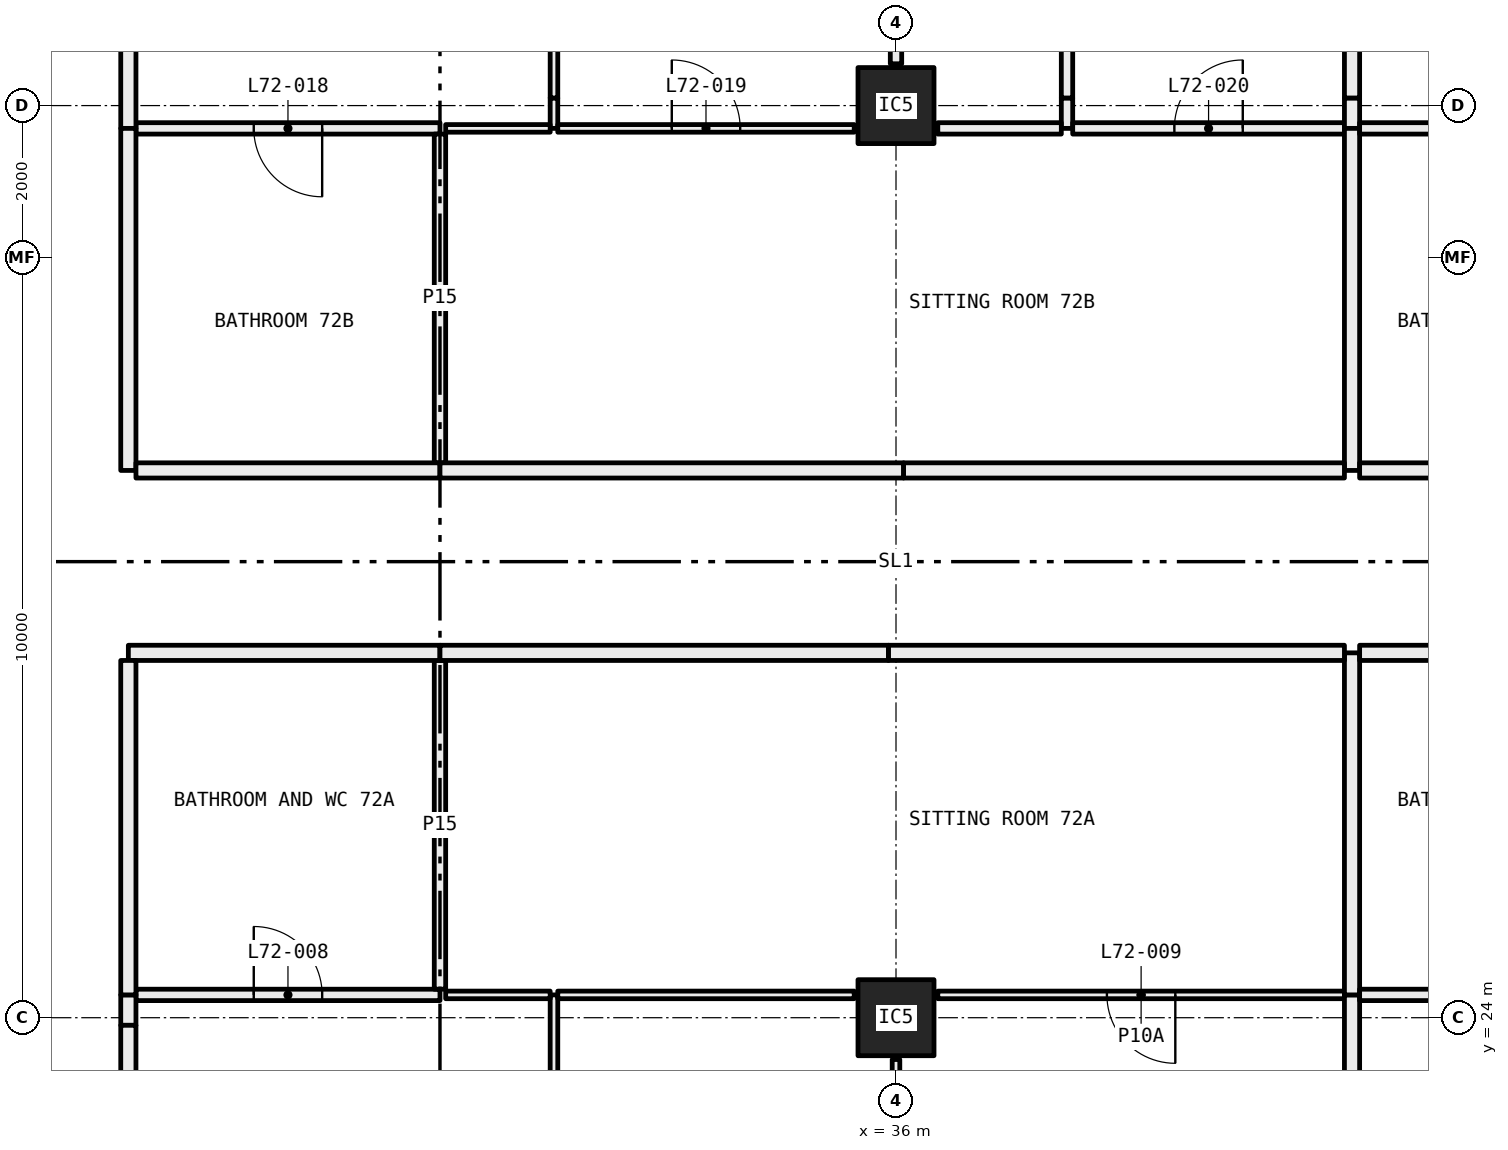
"""IFC4 building model, lengths in metres.
Left out: names, types, materials, properties, quantities, classifications, styles, units other than length and angle.
Written with IfcOpenShell. Run it as: python <this file> out.ifc"""

import sys

from ifc_helpers import new_model, si_unit, direction, frame, frame_2d, origin, origin_2d, place, context, subcontext, project, spatial, rectangle, hollow_rectangle, extrude, element, fill, save


model = new_model("IFC4")
c1 = context("Model", 3, precision=1e-05, world=origin(), true_north=direction((0.0, 1.0)))
c2 = subcontext(c1, "Body", "Model", "MODEL_VIEW")
j1 = project(units=[si_unit("LENGTHUNIT", "METRE"), si_unit("PLANEANGLEUNIT", "RADIAN")], contexts=[c1])
p1 = place(None, origin())
s1 = spatial("IfcSite", under=j1, at=p1, CompositionType="ELEMENT")
p2 = place(p1, origin())
s2 = spatial("IfcBuilding", under=s1, at=p2, CompositionType="ELEMENT")
p3 = place(p2, frame((0.0, 0.0, 266.25)))
s3 = spatial("IfcBuildingStorey", under=s2, at=p3, CompositionType="ELEMENT", Elevation=266.25)
for number, where, z_axis, x_axis in (
    (1, (36.0, 24.0, 0.0), (0.0, 0.0, 1.0), (1.0, 0.0, 0.0)),
    (2, (36.0, 36.0, 0.0), (0.0, 0.0, 1.0), (1.0, 0.0, 0.0)),
):
    element("IfcColumn", number, at=place(p3, frame(where, z_axis=z_axis, x_axis=x_axis)), inside=s3, PredefinedType="COLUMN", context=c2, shape_type="SweptSolid", body=[
        extrude(hollow_rectangle(XDim=1.0, YDim=1.0, WallThickness=0.04, at=origin_2d()), origin(), (0.0, 0.0, 1.0), 3.05),
    ])
p4 = place(p3, frame((31.5, 18.05, 0.0), z_axis=(0.0, 0.0, 1.0), x_axis=(0.0, 1.0, 0.0)))
e3 = element("IfcWall", 3, at=p4, inside=s3, PredefinedType="PARTITIONING", context=c2, shape_type="SweptSolid", body=[
    extrude(rectangle(XDim=6.25, YDim=0.1, at=frame_2d((3.125, 0.0))), origin(), (0.0, 0.0, 1.0), 2.45),
])
p5 = place(p4, frame((2.675, 0.0, 0.0)))
e4 = element("IfcOpeningElement", 4, at=p5, cuts=e3, PredefinedType="OPENING", context=c2, shape_type="SweptSolid", body=[
    extrude(rectangle(XDim=0.9, YDim=2.1, at=frame_2d((0.45, 1.05))), frame((0.0, 0.06, 0.0), z_axis=(0.0, -1.0, 0.0), x_axis=(1.0, 0.0, 0.0)), (0.0, 0.0, 1.0), 0.12),
])
p6 = place(p3, frame((30.0, 24.3, 0.0), z_axis=(0.0, 0.0, 1.0), x_axis=(-1.0, 0.0, 0.0)))
e5 = element("IfcWall", 5, at=p6, inside=s3, PredefinedType="PARTITIONING", context=c2, shape_type="SweptSolid", body=[
    extrude(rectangle(XDim=4.0, YDim=0.15, at=frame_2d((2.0, 0.0))), origin(), (0.0, 0.0, 1.0), 3.05),
])
p7 = place(p6, frame((1.55, 0.0, 0.0)))
e6 = element("IfcOpeningElement", 6, at=p7, cuts=e5, PredefinedType="OPENING", context=c2, shape_type="SweptSolid", body=[
    extrude(rectangle(XDim=0.9, YDim=2.1, at=frame_2d((0.45, 1.05))), frame((0.0, 0.085, 0.0), z_axis=(0.0, -1.0, 0.0), x_axis=(1.0, 0.0, 0.0)), (0.0, 0.0, 1.0), 0.17),
])
p8 = place(p3, frame((31.45, 24.3, 0.0), z_axis=(0.0, 0.0, 1.0), x_axis=(-1.0, 0.0, 0.0)))
e7 = element("IfcWall", 7, at=p8, inside=s3, PredefinedType="PARTITIONING", context=c2, shape_type="SweptSolid", body=[
    extrude(rectangle(XDim=1.375, YDim=0.1, at=frame_2d((0.688, 0.0))), origin(), (0.0, 0.0, 1.0), 3.05),
])
p9 = place(p3, frame((25.9, 24.3, 0.0), z_axis=(0.0, 0.0, 1.0), x_axis=(0.0, -1.0, 0.0)))
e8 = element("IfcWall", 8, at=p9, inside=s3, PredefinedType="PARTITIONING", context=c2, shape_type="SweptSolid", body=[
    extrude(rectangle(XDim=0.4, YDim=0.2, at=frame_2d((0.2, 0.0))), origin(), (0.0, 0.0, 1.0), 2.45),
])
p10 = place(p3, frame((25.9, 23.9, 0.0), z_axis=(0.0, 0.0, 1.0), x_axis=(0.0, -1.0, 0.0)))
e9 = element("IfcWall", 9, at=p10, inside=s3, PredefinedType="PARTITIONING", context=c2, shape_type="SweptSolid", body=[
    extrude(rectangle(XDim=5.8, YDim=0.2, at=frame_2d((2.9, 0.0))), origin(), (0.0, 0.0, 1.0), 3.05),
])
p11 = place(p3, frame((36.0, 18.05, 0.0), z_axis=(0.0, 0.0, 1.0), x_axis=(0.0, 1.0, 0.0)))
e10 = element("IfcWall", 10, at=p11, inside=s3, PredefinedType="PARTITIONING", context=c2, shape_type="SweptSolid", body=[
    extrude(rectangle(XDim=5.4, YDim=0.1, at=frame_2d((2.7, 0.0))), origin(), (0.0, 0.0, 1.0), 2.45),
])
p12 = place(p3, frame((35.45, 24.3, 0.0), z_axis=(0.0, 0.0, 1.0), x_axis=(-1.0, 0.0, 0.0)))
e11 = element("IfcWall", 11, at=p12, inside=s3, PredefinedType="PARTITIONING", context=c2, shape_type="SweptSolid", body=[
    extrude(rectangle(XDim=3.9, YDim=0.1, at=frame_2d((1.95, 0.0))), origin(), (0.0, 0.0, 1.0), 3.05),
])
p13 = place(p3, frame((41.9, 24.3, 0.0), z_axis=(0.0, 0.0, 1.0), x_axis=(-1.0, 0.0, 0.0)))
e12 = element("IfcWall", 12, at=p13, inside=s3, PredefinedType="PARTITIONING", context=c2, shape_type="SweptSolid", body=[
    extrude(rectangle(XDim=5.35, YDim=0.1, at=frame_2d((2.675, 0.0))), origin(), (0.0, 0.0, 1.0), 3.05),
])
p14 = place(p13, frame((2.225, 0.0, 0.0)))
e13 = element("IfcOpeningElement", 13, at=p14, cuts=e12, PredefinedType="OPENING", context=c2, shape_type="SweptSolid", body=[
    extrude(rectangle(XDim=0.9, YDim=2.1, at=frame_2d((0.45, 1.05))), frame((0.0, 0.06, 0.0), z_axis=(0.0, -1.0, 0.0), x_axis=(1.0, 0.0, 0.0)), (0.0, 0.0, 1.0), 0.12),
])
p15 = place(p3, frame((42.0, 18.0, 0.0), z_axis=(0.0, 0.0, 1.0), x_axis=(0.0, 1.0, 0.0)))
e14 = element("IfcWall", 14, at=p15, inside=s3, PredefinedType="PARTITIONING", context=c2, shape_type="SweptSolid", body=[
    extrude(rectangle(XDim=6.3, YDim=0.2, at=frame_2d((3.15, 0.0))), origin(), (0.0, 0.0, 1.0), 2.45),
])
p16 = place(p3, frame((30.0, 24.375, 0.0), z_axis=(0.0, 0.0, 1.0), x_axis=(0.0, 1.0, 0.0)))
e15 = element("IfcWall", 15, at=p16, inside=s3, PredefinedType="PARTITIONING", context=c2, shape_type="SweptSolid", body=[
    extrude(rectangle(XDim=4.325, YDim=0.15, at=frame_2d((2.163, 0.0))), origin(), (0.0, 0.0, 1.0), 3.05),
])
p17 = place(p3, frame((30.0, 28.8, 0.0), z_axis=(0.0, 0.0, 1.0), x_axis=(-1.0, 0.0, 0.0)))
e16 = element("IfcWall", 16, at=p17, inside=s3, PredefinedType="PARTITIONING", context=c2, shape_type="SweptSolid", body=[
    extrude(rectangle(XDim=4.1, YDim=0.2, at=frame_2d((2.05, 0.0))), origin(), (0.0, 0.0, 1.0), 3.05),
])
p18 = place(p3, frame((25.9, 28.7, 0.0), z_axis=(0.0, 0.0, 1.0), x_axis=(0.0, -1.0, 0.0)))
e17 = element("IfcWall", 17, at=p18, inside=s3, PredefinedType="PARTITIONING", context=c2, shape_type="SweptSolid", body=[
    extrude(rectangle(XDim=4.4, YDim=0.2, at=frame_2d((2.2, 0.0))), origin(), (0.0, 0.0, 1.0), 3.05),
])
p19 = place(p3, frame((42.0, 24.3, 0.0), z_axis=(0.0, 0.0, 1.0), x_axis=(0.0, 1.0, 0.0)))
e18 = element("IfcWall", 18, at=p19, inside=s3, PredefinedType="PARTITIONING", context=c2, shape_type="SweptSolid", body=[
    extrude(rectangle(XDim=4.5, YDim=0.2, at=frame_2d((2.25, 0.0))), origin(), (0.0, 0.0, 1.0), 3.05),
])
p20 = place(p3, frame((41.9, 28.8, 0.0), z_axis=(0.0, 0.0, 1.0), x_axis=(-1.0, 0.0, 0.0)))
e19 = element("IfcWall", 19, at=p20, inside=s3, PredefinedType="PARTITIONING", context=c2, shape_type="SweptSolid", body=[
    extrude(rectangle(XDim=6.0, YDim=0.2, at=frame_2d((3.0, 0.0))), origin(), (0.0, 0.0, 1.0), 2.45),
])
p21 = place(p3, frame((35.9, 28.8, 0.0), z_axis=(0.0, 0.0, 1.0), x_axis=(-1.0, 0.0, 0.0)))
e20 = element("IfcWall", 20, at=p21, inside=s3, PredefinedType="PARTITIONING", context=c2, shape_type="SweptSolid", body=[
    extrude(rectangle(XDim=5.9, YDim=0.2, at=frame_2d((2.95, 0.0))), origin(), (0.0, 0.0, 1.0), 3.05),
])
p22 = place(p3, frame((31.5, 35.7, 0.0), z_axis=(0.0, 0.0, 1.0), x_axis=(0.0, 1.0, 0.0)))
e21 = element("IfcWall", 21, at=p22, inside=s3, PredefinedType="PARTITIONING", context=c2, shape_type="SweptSolid", body=[
    extrude(rectangle(XDim=0.4, YDim=0.1, at=frame_2d((0.2, 0.0))), origin(), (0.0, 0.0, 1.0), 2.45),
])
p23 = place(p3, frame((31.5, 36.1, 0.0), z_axis=(0.0, 0.0, 1.0), x_axis=(0.0, 1.0, 0.0)))
e22 = element("IfcWall", 22, at=p23, inside=s3, PredefinedType="PARTITIONING", context=c2, shape_type="SweptSolid", body=[
    extrude(rectangle(XDim=5.85, YDim=0.1, at=frame_2d((2.925, 0.0))), origin(), (0.0, 0.0, 1.0), 3.05),
])
p24 = place(p23, frame((2.475, 0.0, 0.0)))
e23 = element("IfcOpeningElement", 23, at=p24, cuts=e22, PredefinedType="OPENING", context=c2, shape_type="SweptSolid", body=[
    extrude(rectangle(XDim=0.9, YDim=2.1, at=frame_2d((0.45, 1.05))), frame((0.0, 0.06, 0.0), z_axis=(0.0, -1.0, 0.0), x_axis=(1.0, 0.0, 0.0)), (0.0, 0.0, 1.0), 0.12),
])
p25 = place(p3, frame((26.0, 35.7, 0.0), z_axis=(0.0, 0.0, 1.0), x_axis=(1.0, 0.0, 0.0)))
e24 = element("IfcWall", 24, at=p25, inside=s3, PredefinedType="PARTITIONING", context=c2, shape_type="SweptSolid", body=[
    extrude(rectangle(XDim=4.0, YDim=0.15, at=frame_2d((2.0, 0.0))), origin(), (0.0, 0.0, 1.0), 3.05),
])
p26 = place(p25, frame((1.55, 0.0, 0.0)))
e25 = element("IfcOpeningElement", 25, at=p26, cuts=e24, PredefinedType="OPENING", context=c2, shape_type="SweptSolid", body=[
    extrude(rectangle(XDim=0.9, YDim=2.1, at=frame_2d((0.45, 1.05))), frame((0.0, 0.085, 0.0), z_axis=(0.0, -1.0, 0.0), x_axis=(1.0, 0.0, 0.0)), (0.0, 0.0, 1.0), 0.17),
])
p27 = place(p3, frame((30.075, 35.7, 0.0), z_axis=(0.0, 0.0, 1.0), x_axis=(1.0, 0.0, 0.0)))
e26 = element("IfcWall", 26, at=p27, inside=s3, PredefinedType="PARTITIONING", context=c2, shape_type="SweptSolid", body=[
    extrude(rectangle(XDim=1.375, YDim=0.1, at=frame_2d((0.688, 0.0))), origin(), (0.0, 0.0, 1.0), 3.05),
])
p28 = place(p3, frame((25.9, 41.9, 0.0), z_axis=(0.0, 0.0, 1.0), x_axis=(0.0, -1.0, 0.0)))
e27 = element("IfcWall", 27, at=p28, inside=s3, PredefinedType="PARTITIONING", context=c2, shape_type="SweptSolid", body=[
    extrude(rectangle(XDim=6.2, YDim=0.2, at=frame_2d((3.1, 0.0))), origin(), (0.0, 0.0, 1.0), 2.45),
])
p29 = place(p3, frame((36.0, 36.55, 0.0), z_axis=(0.0, 0.0, 1.0), x_axis=(0.0, 1.0, 0.0)))
e28 = element("IfcWall", 28, at=p29, inside=s3, PredefinedType="PARTITIONING", context=c2, shape_type="SweptSolid", body=[
    extrude(rectangle(XDim=1.55, YDim=0.15, at=frame_2d((0.775, 0.0))), origin(), (0.0, 0.0, 1.0), 2.45),
])
p30 = place(p29, frame((0.325, 0.0, 0.0)))
e29 = element("IfcOpeningElement", 29, at=p30, cuts=e28, PredefinedType="OPENING", context=c2, shape_type="SweptSolid", body=[
    extrude(rectangle(XDim=0.9, YDim=2.1, at=frame_2d((0.45, 1.05))), frame((0.0, 0.085, 0.0), z_axis=(0.0, -1.0, 0.0), x_axis=(1.0, 0.0, 0.0)), (0.0, 0.0, 1.0), 0.17),
])
p31 = place(p3, frame((31.55, 35.7, 0.0), z_axis=(0.0, 0.0, 1.0), x_axis=(1.0, 0.0, 0.0)))
e30 = element("IfcWall", 30, at=p31, inside=s3, PredefinedType="PARTITIONING", context=c2, shape_type="SweptSolid", body=[
    extrude(rectangle(XDim=3.9, YDim=0.1, at=frame_2d((1.95, 0.0))), origin(), (0.0, 0.0, 1.0), 3.05),
])
p32 = place(p31, frame((1.5, 0.0, 0.0)))
e31 = element("IfcOpeningElement", 31, at=p32, cuts=e30, PredefinedType="OPENING", context=c2, shape_type="SweptSolid", body=[
    extrude(rectangle(XDim=0.9, YDim=2.1, at=frame_2d((0.45, 1.05))), frame((0.0, 0.06, 0.0), z_axis=(0.0, -1.0, 0.0), x_axis=(1.0, 0.0, 0.0)), (0.0, 0.0, 1.0), 0.12),
])
p33 = place(p3, frame((38.25, 35.7, 0.0), z_axis=(0.0, 0.0, 1.0), x_axis=(0.0, 1.0, 0.0)))
e32 = element("IfcWall", 32, at=p33, inside=s3, PredefinedType="PARTITIONING", context=c2, shape_type="SweptSolid", body=[
    extrude(rectangle(XDim=0.4, YDim=0.15, at=frame_2d((0.2, 0.0))), origin(), (0.0, 0.0, 1.0), 2.45),
])
p34 = place(p3, frame((38.25, 36.1, 0.0), z_axis=(0.0, 0.0, 1.0), x_axis=(0.0, 1.0, 0.0)))
e33 = element("IfcWall", 33, at=p34, inside=s3, PredefinedType="PARTITIONING", context=c2, shape_type="SweptSolid", body=[
    extrude(rectangle(XDim=2.0, YDim=0.15, at=frame_2d((1.0, 0.0))), origin(), (0.0, 0.0, 1.0), 3.05),
])
p35 = place(p3, frame((36.55, 35.7, 0.0), z_axis=(0.0, 0.0, 1.0), x_axis=(1.0, 0.0, 0.0)))
e34 = element("IfcWall", 34, at=p35, inside=s3, PredefinedType="PARTITIONING", context=c2, shape_type="SweptSolid", body=[
    extrude(rectangle(XDim=1.625, YDim=0.15, at=frame_2d((0.812, 0.0))), origin(), (0.0, 0.0, 1.0), 3.05),
])
p36 = place(p3, frame((38.325, 35.7, 0.0), z_axis=(0.0, 0.0, 1.0), x_axis=(1.0, 0.0, 0.0)))
e35 = element("IfcWall", 35, at=p36, inside=s3, PredefinedType="PARTITIONING", context=c2, shape_type="SweptSolid", body=[
    extrude(rectangle(XDim=3.575, YDim=0.15, at=frame_2d((1.788, 0.0))), origin(), (0.0, 0.0, 1.0), 3.05),
])
p37 = place(p36, frame((1.337, 0.0, 0.0)))
e36 = element("IfcOpeningElement", 36, at=p37, cuts=e35, PredefinedType="OPENING", context=c2, shape_type="SweptSolid", body=[
    extrude(rectangle(XDim=0.9, YDim=2.1, at=frame_2d((0.45, 1.05))), frame((0.0, 0.085, 0.0), z_axis=(0.0, -1.0, 0.0), x_axis=(1.0, 0.0, 0.0)), (0.0, 0.0, 1.0), 0.17),
])
p38 = place(p3, frame((42.0, 35.7, 0.0), z_axis=(0.0, 0.0, 1.0), x_axis=(0.0, 1.0, 0.0)))
e37 = element("IfcWall", 37, at=p38, inside=s3, PredefinedType="PARTITIONING", context=c2, shape_type="SweptSolid", body=[
    extrude(rectangle(XDim=0.4, YDim=0.2, at=frame_2d((0.2, 0.0))), origin(), (0.0, 0.0, 1.0), 2.45),
])
p39 = place(p3, frame((42.0, 36.1, 0.0), z_axis=(0.0, 0.0, 1.0), x_axis=(0.0, 1.0, 0.0)))
e38 = element("IfcWall", 38, at=p39, inside=s3, PredefinedType="PARTITIONING", context=c2, shape_type="SweptSolid", body=[
    extrude(rectangle(XDim=2.0, YDim=0.2, at=frame_2d((1.0, 0.0))), origin(), (0.0, 0.0, 1.0), 3.05),
])
p40 = place(p3, frame((30.0, 31.3, 0.0), z_axis=(0.0, 0.0, 1.0), x_axis=(0.0, 1.0, 0.0)))
e39 = element("IfcWall", 39, at=p40, inside=s3, PredefinedType="PARTITIONING", context=c2, shape_type="SweptSolid", body=[
    extrude(rectangle(XDim=4.325, YDim=0.15, at=frame_2d((2.163, 0.0))), origin(), (0.0, 0.0, 1.0), 3.05),
])
p41 = place(p3, frame((25.9, 35.7, 0.0), z_axis=(0.0, 0.0, 1.0), x_axis=(0.0, -1.0, 0.0)))
e40 = element("IfcWall", 40, at=p41, inside=s3, PredefinedType="PARTITIONING", context=c2, shape_type="SweptSolid", body=[
    extrude(rectangle(XDim=4.5, YDim=0.2, at=frame_2d((2.25, 0.0))), origin(), (0.0, 0.0, 1.0), 3.05),
])
p42 = place(p3, frame((26.0, 31.2, 0.0), z_axis=(0.0, 0.0, 1.0), x_axis=(1.0, 0.0, 0.0)))
e41 = element("IfcWall", 41, at=p42, inside=s3, PredefinedType="PARTITIONING", context=c2, shape_type="SweptSolid", body=[
    extrude(rectangle(XDim=4.0, YDim=0.2, at=frame_2d((2.0, 0.0))), origin(), (0.0, 0.0, 1.0), 3.05),
])
p43 = place(p3, frame((42.0, 31.2, 0.0), z_axis=(0.0, 0.0, 1.0), x_axis=(0.0, 1.0, 0.0)))
e42 = element("IfcWall", 42, at=p43, inside=s3, PredefinedType="PARTITIONING", context=c2, shape_type="SweptSolid", body=[
    extrude(rectangle(XDim=4.5, YDim=0.2, at=frame_2d((2.25, 0.0))), origin(), (0.0, 0.0, 1.0), 3.05),
])
p44 = place(p3, frame((30.0, 31.2, 0.0), z_axis=(0.0, 0.0, 1.0), x_axis=(1.0, 0.0, 0.0)))
e43 = element("IfcWall", 43, at=p44, inside=s3, PredefinedType="PARTITIONING", context=c2, shape_type="SweptSolid", body=[
    extrude(rectangle(XDim=6.1, YDim=0.2, at=frame_2d((3.05, 0.0))), origin(), (0.0, 0.0, 1.0), 2.45),
])
p45 = place(p3, frame((36.1, 31.2, 0.0), z_axis=(0.0, 0.0, 1.0), x_axis=(1.0, 0.0, 0.0)))
e44 = element("IfcWall", 44, at=p45, inside=s3, PredefinedType="PARTITIONING", context=c2, shape_type="SweptSolid", body=[
    extrude(rectangle(XDim=5.8, YDim=0.2, at=frame_2d((2.9, 0.0))), origin(), (0.0, 0.0, 1.0), 3.05),
])
p46 = place(p3, frame((46.0, 24.3, 0.0), z_axis=(0.0, 0.0, 1.0), x_axis=(-1.0, 0.0, 0.0)))
e45 = element("IfcWall", 45, at=p46, inside=s3, PredefinedType="PARTITIONING", context=c2, shape_type="SweptSolid", body=[
    extrude(rectangle(XDim=3.9, YDim=0.15, at=frame_2d((1.95, 0.0))), origin(), (0.0, 0.0, 1.0), 3.05),
])
p47 = place(p46, frame((1.5, 0.0, 0.0)))
e46 = element("IfcOpeningElement", 46, at=p47, cuts=e45, PredefinedType="OPENING", context=c2, shape_type="SweptSolid", body=[
    extrude(rectangle(XDim=0.9, YDim=2.1, at=frame_2d((0.45, 1.05))), frame((0.0, 0.085, 0.0), z_axis=(0.0, -1.0, 0.0), x_axis=(1.0, 0.0, 0.0)), (0.0, 0.0, 1.0), 0.17),
])
p48 = place(p3, frame((46.0, 28.8, 0.0), z_axis=(0.0, 0.0, 1.0), x_axis=(-1.0, 0.0, 0.0)))
e47 = element("IfcWall", 47, at=p48, inside=s3, PredefinedType="PARTITIONING", context=c2, shape_type="SweptSolid", body=[
    extrude(rectangle(XDim=3.9, YDim=0.2, at=frame_2d((1.95, 0.0))), origin(), (0.0, 0.0, 1.0), 3.05),
])
p49 = place(p3, frame((42.1, 35.7, 0.0), z_axis=(0.0, 0.0, 1.0), x_axis=(1.0, 0.0, 0.0)))
e48 = element("IfcWall", 48, at=p49, inside=s3, PredefinedType="PARTITIONING", context=c2, shape_type="SweptSolid", body=[
    extrude(rectangle(XDim=3.9, YDim=0.15, at=frame_2d((1.95, 0.0))), origin(), (0.0, 0.0, 1.0), 3.05),
])
p50 = place(p49, frame((1.5, 0.0, 0.0)))
e49 = element("IfcOpeningElement", 49, at=p50, cuts=e48, PredefinedType="OPENING", context=c2, shape_type="SweptSolid", body=[
    extrude(rectangle(XDim=0.9, YDim=2.1, at=frame_2d((0.45, 1.05))), frame((0.0, 0.085, 0.0), z_axis=(0.0, -1.0, 0.0), x_axis=(1.0, 0.0, 0.0)), (0.0, 0.0, 1.0), 0.17),
])
p51 = place(p3, frame((42.1, 31.2, 0.0), z_axis=(0.0, 0.0, 1.0), x_axis=(1.0, 0.0, 0.0)))
e50 = element("IfcWall", 50, at=p51, inside=s3, PredefinedType="PARTITIONING", context=c2, shape_type="SweptSolid", body=[
    extrude(rectangle(XDim=4.0, YDim=0.2, at=frame_2d((2.0, 0.0))), origin(), (0.0, 0.0, 1.0), 3.05),
])
p52 = place(p7, frame((0.9, 0.0, 0.0), x_axis=(-1.0, 0.0, 0.0)))
e51 = element("IfcDoor", 51, at=p52, inside=s3, OperationType="SINGLE_SWING_RIGHT", PredefinedType="DOOR", context=c2, shape_type="SweptSolid", body=[
    extrude(rectangle(XDim=0.9, YDim=2.1, at=frame_2d((0.45, 1.05))), frame((0.0, 0.025, 0.0), z_axis=(0.0, -1.0, 0.0), x_axis=(1.0, 0.0, 0.0)), (0.0, 0.0, 1.0), 0.05),
])
fill(e6, e51)
p53 = place(p14, origin())
e52 = element("IfcDoor", 52, at=p53, inside=s3, OperationType="SINGLE_SWING_RIGHT", PredefinedType="DOOR", context=c2, shape_type="SweptSolid", body=[
    extrude(rectangle(XDim=0.9, YDim=2.1, at=frame_2d((0.45, 1.05))), frame((0.0, 0.025, 0.0), z_axis=(0.0, -1.0, 0.0), x_axis=(1.0, 0.0, 0.0)), (0.0, 0.0, 1.0), 0.05),
])
fill(e13, e52)
p54 = place(p26, frame((0.9, 0.0, 0.0), x_axis=(-1.0, 0.0, 0.0)))
e53 = element("IfcDoor", 53, at=p54, inside=s3, OperationType="SINGLE_SWING_RIGHT", PredefinedType="DOOR", context=c2, shape_type="SweptSolid", body=[
    extrude(rectangle(XDim=0.9, YDim=2.1, at=frame_2d((0.45, 1.05))), frame((0.0, 0.025, 0.0), z_axis=(0.0, -1.0, 0.0), x_axis=(1.0, 0.0, 0.0)), (0.0, 0.0, 1.0), 0.05),
])
fill(e25, e53)
p55 = place(p32, origin())
e54 = element("IfcDoor", 54, at=p55, inside=s3, OperationType="SINGLE_SWING_RIGHT", PredefinedType="DOOR", context=c2, shape_type="SweptSolid", body=[
    extrude(rectangle(XDim=0.9, YDim=2.1, at=frame_2d((0.45, 1.05))), frame((0.0, 0.025, 0.0), z_axis=(0.0, -1.0, 0.0), x_axis=(1.0, 0.0, 0.0)), (0.0, 0.0, 1.0), 0.05),
])
fill(e31, e54)
p56 = place(p37, origin())
e55 = element("IfcDoor", 55, at=p56, inside=s3, OperationType="SINGLE_SWING_LEFT", PredefinedType="DOOR", context=c2, shape_type="SweptSolid", body=[
    extrude(rectangle(XDim=0.9, YDim=2.1, at=frame_2d((0.45, 1.05))), frame((0.0, 0.025, 0.0), z_axis=(0.0, -1.0, 0.0), x_axis=(1.0, 0.0, 0.0)), (0.0, 0.0, 1.0), 0.05),
])
fill(e36, e55)
save(model, sys.argv[1])
